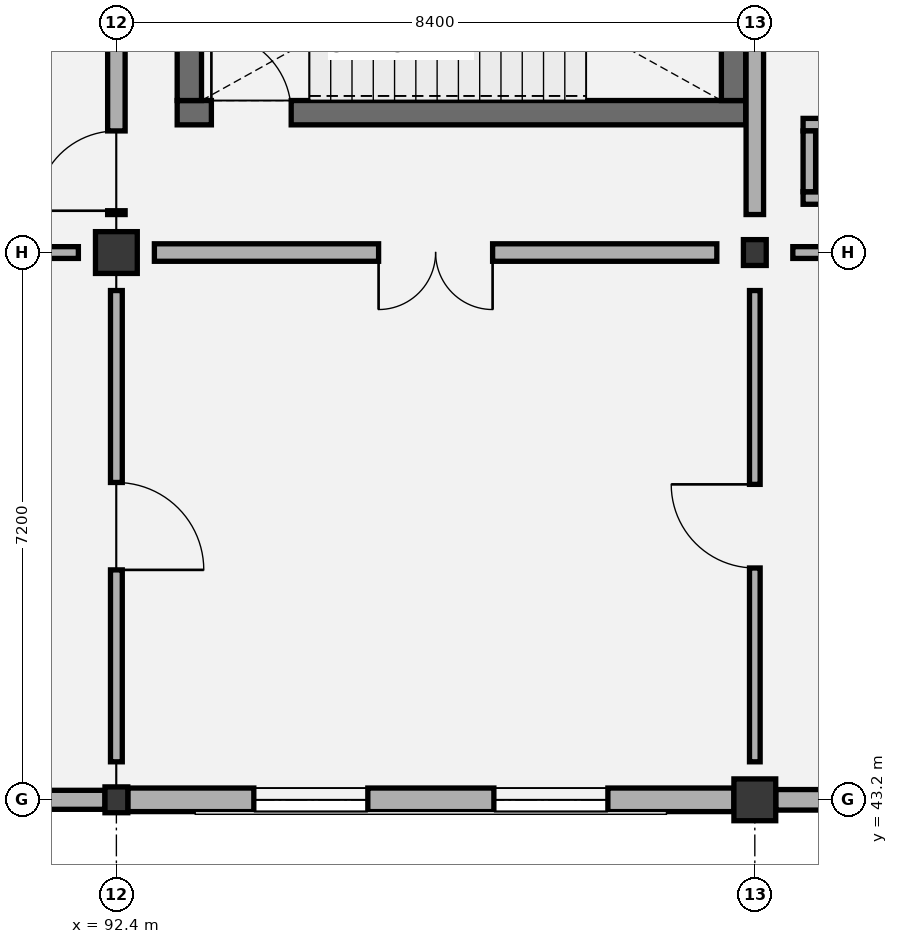
"""IFC4 building model, lengths in metres.
Left out: names, types, materials, properties, quantities, classifications, styles, units other than length and angle.
Written with IfcOpenShell. Run it as: python <this file> out.ifc"""

import sys

from ifc_helpers import new_model, si_unit, direction, frame, frame_2d, origin, origin_2d, place, context, subcontext, project, spatial, rectangle, i_section, extrude, element, fill, save


model = new_model("IFC4")
c1 = context("Model", 3, precision=1e-05, world=origin(), true_north=direction((0.0, 1.0)))
c2 = subcontext(c1, "Body", "Model", "MODEL_VIEW")
j1 = project(units=[si_unit("LENGTHUNIT", "METRE"), si_unit("PLANEANGLEUNIT", "RADIAN")], contexts=[c1])
p1 = place(None, origin())
s1 = spatial("IfcSite", under=j1, at=p1, CompositionType="ELEMENT")
p2 = place(p1, origin())
s2 = spatial("IfcBuilding", under=s1, at=p2, CompositionType="ELEMENT")
p3 = place(p2, frame((0.0, 0.0, 64.8)))
s3 = spatial("IfcBuildingStorey", under=s2, at=p3, CompositionType="ELEMENT", Elevation=64.8)
p4 = place(p3, frame((92.4, 43.2, 0.0), z_axis=(0.0, 0.0, 1.0), x_axis=(1.0, 0.0, 0.0)))
e1 = element("IfcColumn", 1, at=p4, inside=s3, PredefinedType="COLUMN", context=c2, shape_type="SweptSolid", body=[
    extrude(i_section(OverallWidth=0.3, OverallDepth=0.34, WebThickness=0.012, FlangeThickness=0.021, FilletRadius=0.027, at=origin_2d()), origin(), (0.0, 0.0, 1.0), 4.2),
])
for number, where, z_axis, x_axis in (
    (2, (92.4, 50.4, 0.0), (0.0, 0.0, 1.0), (1.0, 0.0, 0.0)),
    (3, (100.8, 43.2, 0.0), (0.0, 0.0, 1.0), (1.0, 0.0, 0.0)),
):
    element("IfcColumn", number, at=place(p3, frame(where, z_axis=z_axis, x_axis=x_axis)), inside=s3, PredefinedType="COLUMN", context=c2, shape_type="SweptSolid", body=[
        extrude(rectangle(XDim=0.55, YDim=0.55, at=origin_2d()), origin(), (0.0, 0.0, 1.0), 4.2),
    ])
p5 = place(p3, frame((100.8, 50.4, 0.0), z_axis=(0.0, 0.0, 1.0), x_axis=(1.0, 0.0, 0.0)))
e4 = element("IfcColumn", 4, at=p5, inside=s3, PredefinedType="COLUMN", context=c2, shape_type="SweptSolid", body=[
    extrude(i_section(OverallWidth=0.3, OverallDepth=0.34, WebThickness=0.012, FlangeThickness=0.021, FilletRadius=0.027, at=origin_2d()), origin(), (0.0, 0.0, 1.0), 4.2),
])
p6 = place(p3, frame((93.2, 52.24, 0.0), z_axis=(0.0, 0.0, 1.0), x_axis=(1.0, 0.0, 0.0)))
e5 = element("IfcWall", 5, at=p6, inside=s3, PredefinedType="SHEAR", context=c2, shape_type="SweptSolid", body=[
    extrude(rectangle(XDim=7.48, YDim=0.32, at=frame_2d((3.74, 0.0))), origin(), (0.0, 0.0, 1.0), 3.9),
])
p7 = place(p6, frame((0.45, 0.0, 0.0)))
e6 = element("IfcOpeningElement", 6, at=p7, cuts=e5, PredefinedType="OPENING", context=c2, shape_type="SweptSolid", body=[
    extrude(rectangle(XDim=1.05, YDim=2.15, at=frame_2d((0.525, 1.075))), frame((0.0, 0.17, 0.0), z_axis=(0.0, -1.0, 0.0), x_axis=(1.0, 0.0, 0.0)), (0.0, 0.0, 1.0), 0.34),
])
for number, where, z_axis, x_axis in (
    (7, (93.36, 52.4, 0.0), (0.0, 0.0, 1.0), (0.0, 1.0, 0.0)),
    (8, (100.52, 52.4, 0.0), (0.0, 0.0, 1.0), (0.0, 1.0, 0.0)),
):
    element("IfcWall", number, at=place(p3, frame(where, z_axis=z_axis, x_axis=x_axis)), inside=s3, PredefinedType="SHEAR", context=c2, shape_type="SweptSolid", body=[
        extrude(rectangle(XDim=3.8, YDim=0.32, at=frame_2d((1.9, 0.0))), origin(), (0.0, 0.0, 1.0), 3.9),
    ])
p8 = place(p3, frame((84.275, 43.2, 0.0), z_axis=(0.0, 0.0, 1.0), x_axis=(1.0, 0.0, 0.0)))
e9 = element("IfcWall", 9, at=p8, inside=s3, PredefinedType="SOLIDWALL", context=c2, shape_type="SweptSolid", body=[
    extrude(rectangle(XDim=7.975, YDim=0.25, at=frame_2d((3.988, 0.0))), origin(), (0.0, 0.0, 1.0), 3.345),
])
p9 = place(p8, frame((0.858, 0.0, 0.95)))
e10 = element("IfcOpeningElement", 10, at=p9, cuts=e9, PredefinedType="OPENING", context=c2, shape_type="SweptSolid", body=[
    extrude(rectangle(XDim=2.7, YDim=1.65, at=frame_2d((1.35, 0.825))), frame((0.0, 0.135, 0.0), z_axis=(0.0, -1.0, 0.0), x_axis=(1.0, 0.0, 0.0)), (0.0, 0.0, 1.0), 0.27),
])
p10 = place(p8, frame((4.417, 0.0, 0.95)))
e11 = element("IfcOpeningElement", 11, at=p10, cuts=e9, PredefinedType="OPENING", context=c2, shape_type="SweptSolid", body=[
    extrude(rectangle(XDim=2.7, YDim=1.65, at=frame_2d((1.35, 0.825))), frame((0.0, 0.135, 0.0), z_axis=(0.0, -1.0, 0.0), x_axis=(1.0, 0.0, 0.0)), (0.0, 0.0, 1.0), 0.27),
])
p11 = place(p3, frame((92.55, 43.2, 0.0), z_axis=(0.0, 0.0, 1.0), x_axis=(1.0, 0.0, 0.0)))
e12 = element("IfcWall", 12, at=p11, inside=s3, PredefinedType="SOLIDWALL", context=c2, shape_type="SweptSolid", body=[
    extrude(rectangle(XDim=7.975, YDim=0.31, at=frame_2d((3.987, 0.0))), origin(), (0.0, 0.0, 1.0), 3.345),
])
p12 = place(p11, frame((1.658, 0.0, 0.95)))
e13 = element("IfcOpeningElement", 13, at=p12, cuts=e12, PredefinedType="OPENING", context=c2, shape_type="SweptSolid", body=[
    extrude(rectangle(XDim=1.5, YDim=1.5, at=frame_2d((0.75, 0.75))), frame((0.0, 0.165, 0.0), z_axis=(0.0, -1.0, 0.0), x_axis=(1.0, 0.0, 0.0)), (0.0, 0.0, 1.0), 0.33),
])
p13 = place(p11, frame((4.817, 0.0, 0.95)))
e14 = element("IfcOpeningElement", 14, at=p13, cuts=e12, PredefinedType="OPENING", context=c2, shape_type="SweptSolid", body=[
    extrude(rectangle(XDim=1.5, YDim=1.5, at=frame_2d((0.75, 0.75))), frame((0.0, 0.165, 0.0), z_axis=(0.0, -1.0, 0.0), x_axis=(1.0, 0.0, 0.0)), (0.0, 0.0, 1.0), 0.33),
])
p14 = place(p3, frame((101.075, 43.2, 0.0), z_axis=(0.0, 0.0, 1.0), x_axis=(1.0, 0.0, 0.0)))
e15 = element("IfcWall", 15, at=p14, inside=s3, PredefinedType="SOLIDWALL", context=c2, shape_type="SweptSolid", body=[
    extrude(rectangle(XDim=7.975, YDim=0.27, at=frame_2d((3.988, 0.0))), origin(), (0.0, 0.0, 1.0), 3.345),
])
p15 = place(p14, frame((1.758, 0.0, 0.95)))
e16 = element("IfcOpeningElement", 16, at=p15, cuts=e15, PredefinedType="OPENING", context=c2, shape_type="SweptSolid", body=[
    extrude(rectangle(XDim=1.35, YDim=1.65, at=frame_2d((0.675, 0.825))), frame((0.0, 0.145, 0.0), z_axis=(0.0, -1.0, 0.0), x_axis=(1.0, 0.0, 0.0)), (0.0, 0.0, 1.0), 0.29),
])
p16 = place(p14, frame((4.867, 0.0, 0.95)))
e17 = element("IfcOpeningElement", 17, at=p16, cuts=e15, PredefinedType="OPENING", context=c2, shape_type="SweptSolid", body=[
    extrude(rectangle(XDim=1.35, YDim=1.65, at=frame_2d((0.675, 0.825))), frame((0.0, 0.145, 0.0), z_axis=(0.0, -1.0, 0.0), x_axis=(1.0, 0.0, 0.0)), (0.0, 0.0, 1.0), 0.29),
])
for number, where, z_axis, x_axis in (
    (18, (101.435, 51.117, 0.0), (0.0, 0.0, 1.0), (1.0, 0.0, 0.0)),
    (19, (101.435, 52.083, 0.0), (0.0, 0.0, 1.0), (1.0, 0.0, 0.0)),
):
    element("IfcWall", number, at=place(p3, frame(where, z_axis=z_axis, x_axis=x_axis)), inside=s3, PredefinedType="PARTITIONING", context=c2, shape_type="SweptSolid", body=[
        extrude(rectangle(XDim=1.43, YDim=0.165, at=frame_2d((0.715, 0.0))), origin(), (0.0, 0.0, 1.0), 3.9),
    ])
p17 = place(p3, frame((101.518, 51.2, 0.0), z_axis=(0.0, 0.0, 1.0), x_axis=(0.0, 1.0, 0.0)))
e20 = element("IfcWall", 20, at=p17, inside=s3, PredefinedType="PARTITIONING", context=c2, shape_type="SweptSolid", body=[
    extrude(rectangle(XDim=0.8, YDim=0.165, at=frame_2d((0.4, 0.0))), origin(), (0.0, 0.0, 1.0), 3.9),
])
p18 = place(p3, frame((92.4, 43.7, 0.0), z_axis=(0.0, 0.0, 1.0), x_axis=(0.0, 1.0, 0.0)))
e21 = element("IfcWall", 21, at=p18, inside=s3, PredefinedType="PARTITIONING", context=c2, shape_type="SweptSolid", body=[
    extrude(rectangle(XDim=6.2, YDim=0.155, at=frame_2d((3.1, 0.0))), origin(), (0.0, 0.0, 1.0), 3.395),
])
p19 = place(p18, frame((2.525, 0.0, 0.0)))
e22 = element("IfcOpeningElement", 22, at=p19, cuts=e21, PredefinedType="OPENING", context=c2, shape_type="SweptSolid", body=[
    extrude(rectangle(XDim=1.15, YDim=2.1, at=frame_2d((0.575, 1.05))), frame((0.0, 0.087, 0.0), z_axis=(0.0, -1.0, 0.0), x_axis=(1.0, 0.0, 0.0)), (0.0, 0.0, 1.0), 0.175),
])
p20 = place(p3, frame((84.5, 50.4, 0.0), z_axis=(0.0, 0.0, 1.0), x_axis=(1.0, 0.0, 0.0)))
e23 = element("IfcWall", 23, at=p20, inside=s3, PredefinedType="PARTITIONING", context=c2, shape_type="SweptSolid", body=[
    extrude(rectangle(XDim=7.4, YDim=0.155, at=frame_2d((3.7, 0.0))), origin(), (0.0, 0.0, 1.0), 3.395),
])
p21 = place(p20, frame((3.15, 0.0, 0.0)))
e24 = element("IfcOpeningElement", 24, at=p21, cuts=e23, PredefinedType="OPENING", context=c2, shape_type="SweptSolid", body=[
    extrude(rectangle(XDim=1.1, YDim=2.1, at=frame_2d((0.55, 1.05))), frame((0.0, 0.087, 0.0), z_axis=(0.0, -1.0, 0.0), x_axis=(1.0, 0.0, 0.0)), (0.0, 0.0, 1.0), 0.175),
])
p22 = place(p3, frame((92.4, 50.9, 0.0), z_axis=(0.0, 0.0, 1.0), x_axis=(0.0, 1.0, 0.0)))
e25 = element("IfcWall", 25, at=p22, inside=s3, PredefinedType="PARTITIONING", context=c2, shape_type="SweptSolid", body=[
    extrude(rectangle(XDim=6.2, YDim=0.23, at=frame_2d((3.1, 0.0))), origin(), (0.0, 0.0, 1.0), 3.605),
])
p23 = place(p22, frame((0.05, 0.0, 0.0)))
e26 = element("IfcOpeningElement", 26, at=p23, cuts=e25, PredefinedType="OPENING", context=c2, shape_type="SweptSolid", body=[
    extrude(rectangle(XDim=1.05, YDim=2.15, at=frame_2d((0.525, 1.075))), frame((0.0, 0.125, 0.0), z_axis=(0.0, -1.0, 0.0), x_axis=(1.0, 0.0, 0.0)), (0.0, 0.0, 1.0), 0.25),
])
p24 = place(p3, frame((100.8, 43.7, 0.0), z_axis=(0.0, 0.0, 1.0), x_axis=(0.0, 1.0, 0.0)))
e27 = element("IfcWall", 27, at=p24, inside=s3, PredefinedType="PARTITIONING", context=c2, shape_type="SweptSolid", body=[
    extrude(rectangle(XDim=6.2, YDim=0.14, at=frame_2d((3.1, 0.0))), origin(), (0.0, 0.0, 1.0), 3.605),
])
p25 = place(p24, frame((2.55, 0.0, 0.0)))
e28 = element("IfcOpeningElement", 28, at=p25, cuts=e27, PredefinedType="OPENING", context=c2, shape_type="SweptSolid", body=[
    extrude(rectangle(XDim=1.1, YDim=2.1, at=frame_2d((0.55, 1.05))), frame((0.0, 0.08, 0.0), z_axis=(0.0, -1.0, 0.0), x_axis=(1.0, 0.0, 0.0)), (0.0, 0.0, 1.0), 0.16),
])
p26 = place(p3, frame((92.9, 50.4, 0.0), z_axis=(0.0, 0.0, 1.0), x_axis=(1.0, 0.0, 0.0)))
e29 = element("IfcWall", 29, at=p26, inside=s3, PredefinedType="PARTITIONING", context=c2, shape_type="SweptSolid", body=[
    extrude(rectangle(XDim=7.4, YDim=0.23, at=frame_2d((3.7, 0.0))), origin(), (0.0, 0.0, 1.0), 3.395),
])
p27 = place(p26, frame((2.95, 0.0, 0.0)))
e30 = element("IfcOpeningElement", 30, at=p27, cuts=e29, PredefinedType="OPENING", context=c2, shape_type="SweptSolid", body=[
    extrude(rectangle(XDim=1.5, YDim=2.15, at=frame_2d((0.75, 1.075))), frame((0.0, 0.125, 0.0), z_axis=(0.0, -1.0, 0.0), x_axis=(1.0, 0.0, 0.0)), (0.0, 0.0, 1.0), 0.25),
])
p28 = place(p3, frame((100.8, 50.9, 0.0), z_axis=(0.0, 0.0, 1.0), x_axis=(0.0, 1.0, 0.0)))
e31 = element("IfcWall", 31, at=p28, inside=s3, PredefinedType="PARTITIONING", context=c2, shape_type="SweptSolid", body=[
    extrude(rectangle(XDim=6.2, YDim=0.23, at=frame_2d((3.1, 0.0))), origin(), (0.0, 0.0, 1.0), 3.395),
])
p29 = place(p3, frame((101.3, 50.4, 0.0), z_axis=(0.0, 0.0, 1.0), x_axis=(1.0, 0.0, 0.0)))
e32 = element("IfcWall", 32, at=p29, inside=s3, PredefinedType="PARTITIONING", context=c2, shape_type="SweptSolid", body=[
    extrude(rectangle(XDim=7.4, YDim=0.155, at=frame_2d((3.7, 0.0))), origin(), (0.0, 0.0, 1.0), 3.395),
])
p30 = place(p29, frame((3.15, 0.0, 0.0)))
e33 = element("IfcOpeningElement", 33, at=p30, cuts=e32, PredefinedType="OPENING", context=c2, shape_type="SweptSolid", body=[
    extrude(rectangle(XDim=1.1, YDim=2.1, at=frame_2d((0.55, 1.05))), frame((0.0, 0.087, 0.0), z_axis=(0.0, -1.0, 0.0), x_axis=(1.0, 0.0, 0.0)), (0.0, 0.0, 1.0), 0.175),
])
p31 = place(p12, origin())
e34 = element("IfcWindow", 34, at=p31, inside=s3, PartitioningType="SINGLE_PANEL", PredefinedType="WINDOW", context=c2, shape_type="SweptSolid", body=[
    extrude(rectangle(XDim=1.5, YDim=1.5, at=frame_2d((0.75, 0.75))), frame((0.0, 0.03, 0.0), z_axis=(0.0, -1.0, 0.0), x_axis=(1.0, 0.0, 0.0)), (0.0, 0.0, 1.0), 0.06),
])
fill(e13, e34)
p32 = place(p13, origin())
e35 = element("IfcWindow", 35, at=p32, inside=s3, PartitioningType="SINGLE_PANEL", PredefinedType="WINDOW", context=c2, shape_type="SweptSolid", body=[
    extrude(rectangle(XDim=1.5, YDim=1.5, at=frame_2d((0.75, 0.75))), frame((0.0, 0.03, 0.0), z_axis=(0.0, -1.0, 0.0), x_axis=(1.0, 0.0, 0.0)), (0.0, 0.0, 1.0), 0.06),
])
fill(e14, e35)
p33 = place(p7, origin())
e36 = element("IfcDoor", 36, at=p33, inside=s3, OperationType="SINGLE_SWING_LEFT", PredefinedType="DOOR", context=c2, shape_type="SweptSolid", body=[
    extrude(rectangle(XDim=1.05, YDim=2.15, at=frame_2d((0.525, 1.075))), frame((0.0, 0.025, 0.0), z_axis=(0.0, -1.0, 0.0), x_axis=(1.0, 0.0, 0.0)), (0.0, 0.0, 1.0), 0.05),
])
fill(e6, e36)
p34 = place(p19, frame((1.15, 0.0, 0.0), z_axis=(0.0, 0.0, 1.0), x_axis=(-1.0, 0.0, 0.0)))
e37 = element("IfcDoor", 37, at=p34, inside=s3, OperationType="SINGLE_SWING_RIGHT", PredefinedType="DOOR", context=c2, shape_type="SweptSolid", body=[
    extrude(rectangle(XDim=1.15, YDim=2.1, at=frame_2d((0.575, 1.05))), frame((0.0, 0.025, 0.0), z_axis=(0.0, -1.0, 0.0), x_axis=(1.0, 0.0, 0.0)), (0.0, 0.0, 1.0), 0.05),
])
fill(e22, e37)
p35 = place(p23, origin())
e38 = element("IfcDoor", 38, at=p35, inside=s3, OperationType="SINGLE_SWING_LEFT", PredefinedType="DOOR", context=c2, shape_type="SweptSolid", body=[
    extrude(rectangle(XDim=1.05, YDim=2.15, at=frame_2d((0.525, 1.075))), frame((0.0, 0.025, 0.0), z_axis=(0.0, -1.0, 0.0), x_axis=(1.0, 0.0, 0.0)), (0.0, 0.0, 1.0), 0.05),
])
fill(e26, e38)
p36 = place(p25, origin())
e39 = element("IfcDoor", 39, at=p36, inside=s3, OperationType="SINGLE_SWING_RIGHT", PredefinedType="DOOR", context=c2, shape_type="SweptSolid", body=[
    extrude(rectangle(XDim=1.1, YDim=2.1, at=frame_2d((0.55, 1.05))), frame((0.0, 0.025, 0.0), z_axis=(0.0, -1.0, 0.0), x_axis=(1.0, 0.0, 0.0)), (0.0, 0.0, 1.0), 0.05),
])
fill(e28, e39)
p37 = place(p27, frame((1.5, 0.0, 0.0), z_axis=(0.0, 0.0, 1.0), x_axis=(-1.0, 0.0, 0.0)))
e40 = element("IfcDoor", 40, at=p37, inside=s3, OperationType="DOUBLE_DOOR_SINGLE_SWING", PredefinedType="DOOR", context=c2, shape_type="SweptSolid", body=[
    extrude(rectangle(XDim=1.5, YDim=2.15, at=frame_2d((0.75, 1.075))), frame((0.0, 0.025, 0.0), z_axis=(0.0, -1.0, 0.0), x_axis=(1.0, 0.0, 0.0)), (0.0, 0.0, 1.0), 0.05),
])
fill(e30, e40)
save(model, sys.argv[1])
